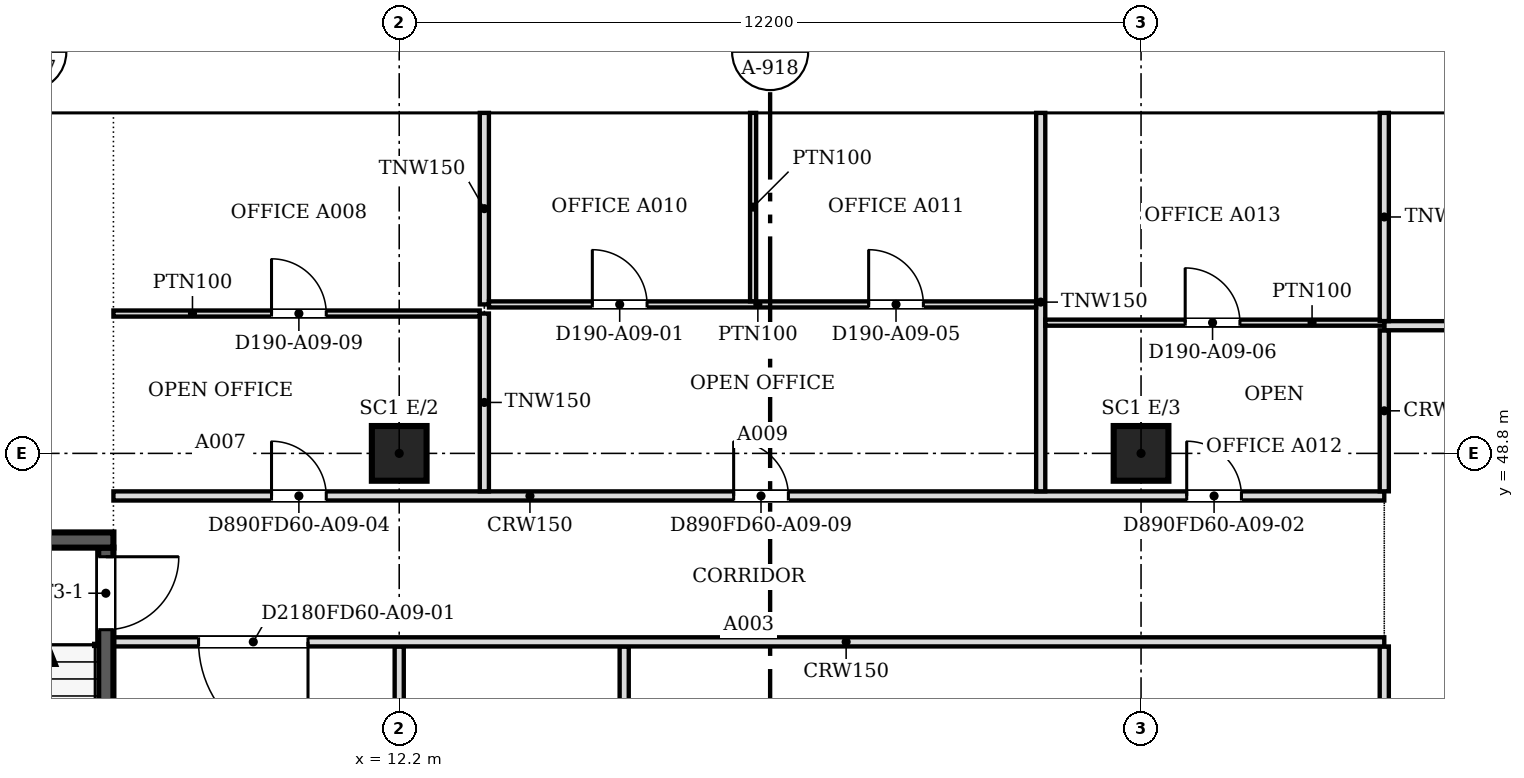
"""IFC4 building model, lengths in metres.
Left out: names, types, materials, properties, quantities, classifications, styles, units other than length and angle.
Written with IfcOpenShell. Run it as: python <this file> out.ifc"""

import sys

from ifc_helpers import new_model, si_unit, direction, frame, frame_2d, origin, origin_2d, place, context, subcontext, project, spatial, polyline, rectangle, outline, extrude, faceted_brep, source, transform, mapped, element, fill, save


model = new_model("IFC4")
c1 = context("Model", 3, precision=1e-05, world=origin(), true_north=direction((0.0, 1.0)))
c2 = subcontext(c1, "Body", "Model", "MODEL_VIEW")
j1 = project(units=[si_unit("LENGTHUNIT", "METRE"), si_unit("PLANEANGLEUNIT", "RADIAN")], contexts=[c1])
p1 = place(None, origin())
s1 = spatial("IfcSite", under=j1, at=p1, CompositionType="ELEMENT")
p2 = place(p1, origin())
s2 = spatial("IfcBuilding", under=s1, at=p2, CompositionType="ELEMENT")
p3 = place(p2, frame((0.0, 0.0, 99.0)))
s3 = spatial("IfcBuildingStorey", under=s2, at=p3, CompositionType="ELEMENT", Elevation=99.0)
for number, where, z_axis, x_axis in (
    (1, (12.2, 48.8, 0.0), (0.0, 0.0, 1.0), (1.0, 0.0, 0.0)),
    (2, (24.4, 48.8, 0.0), (0.0, 0.0, 1.0), (1.0, 0.0, 0.0)),
):
    element("IfcColumn", number, at=place(p3, frame(where, z_axis=z_axis, x_axis=x_axis)), inside=s3, PredefinedType="COLUMN", context=c2, shape_type="SweptSolid", body=[
        extrude(rectangle(XDim=0.9, YDim=0.9, at=origin_2d()), origin(), (0.0, 0.0, 1.0), 3.6),
    ])
m1 = source(origin(), c2, "Body", "SweptSolid", [
    extrude(outline(polyline([(3.05, 0.0), (6.1, 3.8), (3.05, 7.6), (0.0, 3.8), (3.05, 0.0)])), frame((0.0, 0.25, 0.0), z_axis=(0.0, -1.0, 0.0), x_axis=(1.0, 0.0, 0.0)), (0.0, 0.0, 1.0), 0.5),
])
p4 = place(p3, frame((33.55, 54.65, -3.8), z_axis=(0.0, 0.0, 1.0), x_axis=(-1.0, 0.0, 0.0)))
e3 = element("IfcWall", 3, at=p4, inside=s3, PredefinedType="SOLIDWALL", context=c2, shape_type="MappedRepresentation", body=[
    mapped(m1, transform((0.0, 0.0, 0.0), scale=1.0)),
])
m2 = source(origin(), c2, "Body", "SweptSolid", [
    extrude(outline(polyline([(3.05, 0.399), (5.78, 3.8), (3.05, 7.201), (0.321, 3.8), (3.05, 0.399)])), frame((0.0, 0.26, 0.0), z_axis=(0.0, -1.0, 0.0), x_axis=(1.0, 0.0, 0.0)), (0.0, 0.0, 1.0), 0.52),
])
p5 = place(p4, origin())
e4 = element("IfcOpeningElement", 4, at=p5, cuts=e3, PredefinedType="OPENING", context=c2, shape_type="MappedRepresentation", body=[
    mapped(m2, transform((0.0, 0.0, 0.0), scale=1.0)),
])
m3 = source(origin(), c2, "Body", "Brep", [
    faceted_brep([(3.05, -0.25, 0.0), (6.1, -0.25, 3.8), (6.1, -0.25, 3.8), (3.05, -0.25, 7.6), (0.0, -0.25, 3.8), (0.0, 0.25, 3.8), (3.05, 0.25, 7.6), (6.1, 0.25, 3.8), (6.1, 0.25, 3.8), (3.05, 0.25, 0.0)], [[[0, 1, 2, 3, 4]], [[5, 6, 7, 8, 9]], [[9, 8, 1, 0]], [[7, 6, 3, 2]], [[6, 5, 4, 3]], [[5, 9, 0, 4]], [[1, 8, 7, 2]]]),
])
p6 = place(p3, frame((27.45, 54.65, -3.8), z_axis=(0.0, 0.0, 1.0), x_axis=(-1.0, 0.0, 0.0)))
e5 = element("IfcWall", 5, at=p6, inside=s3, PredefinedType="SOLIDWALL", context=c2, shape_type="MappedRepresentation", body=[
    mapped(m3, transform((0.0, 0.0, 0.0), scale=1.0)),
])
p7 = place(p6, origin())
e6 = element("IfcOpeningElement", 6, at=p7, cuts=e5, PredefinedType="OPENING", context=c2, shape_type="MappedRepresentation", body=[
    mapped(m2, transform((0.0, 0.0, 0.0), scale=1.0)),
])
p8 = place(p3, frame((21.35, 54.65, -3.8), z_axis=(0.0, 0.0, 1.0), x_axis=(-1.0, 0.0, 0.0)))
e7 = element("IfcWall", 7, at=p8, inside=s3, PredefinedType="SOLIDWALL", context=c2, shape_type="MappedRepresentation", body=[
    mapped(m1, transform((0.0, 0.0, 0.0), scale=1.0)),
])
p9 = place(p8, origin())
e8 = element("IfcOpeningElement", 8, at=p9, cuts=e7, PredefinedType="OPENING", context=c2, shape_type="MappedRepresentation", body=[
    mapped(m2, transform((0.0, 0.0, 0.0), scale=1.0)),
])
p10 = place(p3, frame((15.25, 54.65, -3.8), z_axis=(0.0, 0.0, 1.0), x_axis=(-1.0, 0.0, 0.0)))
e9 = element("IfcWall", 9, at=p10, inside=s3, PredefinedType="SOLIDWALL", context=c2, shape_type="MappedRepresentation", body=[
    mapped(m1, transform((0.0, 0.0, 0.0), scale=1.0)),
])
p11 = place(p10, origin())
e10 = element("IfcOpeningElement", 10, at=p11, cuts=e9, PredefinedType="OPENING", context=c2, shape_type="MappedRepresentation", body=[
    mapped(m2, transform((0.0, 0.0, 0.0), scale=1.0)),
])
m4 = source(origin(), c2, "Body", "Brep", [
    faceted_brep([(3.003, -0.25, 0.0), (3.05, -0.25, 0.06), (3.05, -0.25, 7.54), (3.003, -0.25, 7.6), (0.0, -0.25, 3.8), (0.0, 0.25, 3.8), (2.957, 0.25, 7.541), (2.957, 0.25, 0.059), (3.003, 0.0, 0.0), (3.003, 0.0, 7.6)], [[[0, 1, 2, 3, 4]], [[5, 6, 7]], [[1, 0, 8]], [[9, 3, 2]], [[6, 5, 4, 3, 9]], [[5, 7, 8, 0, 4]], [[1, 8, 7, 6, 9, 2]]]),
])
p12 = place(p3, frame((9.15, 54.65, -3.8), z_axis=(0.0, 0.0, 1.0), x_axis=(-1.0, 0.0, 0.0)))
e11 = element("IfcWall", 11, at=p12, inside=s3, PredefinedType="SOLIDWALL", context=c2, shape_type="MappedRepresentation", body=[
    mapped(m4, transform((0.0, 0.0, 0.0), scale=1.0)),
])
m5 = source(origin(), c2, "Body", "SweptSolid", [
    extrude(outline(polyline([(2.803, 6.944), (0.319, 3.8), (2.803, 0.656), (2.803, 6.944)])), frame((0.0, 0.26, 0.0), z_axis=(0.0, -1.0, 0.0), x_axis=(1.0, 0.0, 0.0)), (0.0, 0.0, 1.0), 0.52),
])
p13 = place(p12, origin())
e12 = element("IfcOpeningElement", 12, at=p13, cuts=e11, PredefinedType="OPENING", context=c2, shape_type="MappedRepresentation", body=[
    mapped(m5, transform((0.0, 0.0, 0.0), scale=1.0)),
])
p14 = place(p2, frame((0.0, 0.0, 102.8)))
s4 = spatial("IfcBuildingStorey", under=s2, at=p14, CompositionType="ELEMENT", Elevation=102.8)
p15 = place(p14, frame((30.5, 54.65, -3.8), z_axis=(0.0, 0.0, 1.0), x_axis=(-1.0, 0.0, 0.0)))
e13 = element("IfcWall", 13, at=p15, inside=s4, PredefinedType="SOLIDWALL", context=c2, shape_type="MappedRepresentation", body=[
    mapped(m1, transform((0.0, 0.0, 0.0), scale=1.0)),
])
p16 = place(p15, origin())
e14 = element("IfcOpeningElement", 14, at=p16, cuts=e13, PredefinedType="OPENING", context=c2, shape_type="MappedRepresentation", body=[
    mapped(m2, transform((0.0, 0.0, 0.0), scale=1.0)),
])
p17 = place(p14, frame((24.4, 54.65, -3.8), z_axis=(0.0, 0.0, 1.0), x_axis=(-1.0, 0.0, 0.0)))
e15 = element("IfcWall", 15, at=p17, inside=s4, PredefinedType="SOLIDWALL", context=c2, shape_type="MappedRepresentation", body=[
    mapped(m3, transform((0.0, 0.0, 0.0), scale=1.0)),
])
p18 = place(p17, origin())
e16 = element("IfcOpeningElement", 16, at=p18, cuts=e15, PredefinedType="OPENING", context=c2, shape_type="MappedRepresentation", body=[
    mapped(m2, transform((0.0, 0.0, 0.0), scale=1.0)),
])
p19 = place(p14, frame((18.3, 54.65, -3.8), z_axis=(0.0, 0.0, 1.0), x_axis=(-1.0, 0.0, 0.0)))
e17 = element("IfcWall", 17, at=p19, inside=s4, PredefinedType="SOLIDWALL", context=c2, shape_type="MappedRepresentation", body=[
    mapped(m1, transform((0.0, 0.0, 0.0), scale=1.0)),
])
p20 = place(p19, origin())
e18 = element("IfcOpeningElement", 18, at=p20, cuts=e17, PredefinedType="OPENING", context=c2, shape_type="MappedRepresentation", body=[
    mapped(m2, transform((0.0, 0.0, 0.0), scale=1.0)),
])
m6 = source(origin(), c2, "Body", "Brep", [
    faceted_brep([(3.05, -0.25, 0.0), (6.053, -0.25, 3.8), (3.05, -0.25, 7.6), (0.0, -0.25, 3.8), (0.0, 0.25, 3.8), (3.05, 0.25, 7.6), (6.007, 0.25, 3.859), (6.007, 0.25, 3.741), (3.05, 0.25, 0.0), (6.053, 0.0, 3.8)], [[[0, 1, 2, 3]], [[4, 5, 6, 7, 8]], [[8, 7, 9, 1, 0]], [[6, 5, 2, 1, 9]], [[5, 4, 3, 2]], [[4, 8, 0, 3]], [[9, 7, 6]]]),
])
p21 = place(p14, frame((12.2, 54.65, -3.8), z_axis=(0.0, 0.0, 1.0), x_axis=(-1.0, 0.0, 0.0)))
e19 = element("IfcWall", 19, at=p21, inside=s4, PredefinedType="SOLIDWALL", context=c2, shape_type="MappedRepresentation", body=[
    mapped(m6, transform((0.0, 0.0, 0.0), scale=1.0)),
])
m7 = source(origin(), c2, "Body", "SweptSolid", [
    extrude(outline(polyline([(3.049, 0.401), (5.735, 3.8), (3.049, 7.199), (0.321, 3.8), (3.049, 0.401)])), frame((0.0, 0.26, 0.0), z_axis=(0.0, -1.0, 0.0), x_axis=(1.0, 0.0, 0.0)), (0.0, 0.0, 1.0), 0.52),
])
p22 = place(p21, origin())
e20 = element("IfcOpeningElement", 20, at=p22, cuts=e19, PredefinedType="OPENING", context=c2, shape_type="MappedRepresentation", body=[
    mapped(m7, transform((0.0, 0.0, 0.0), scale=1.0)),
])
p23 = place(p3, frame((3.6, 47.375, 0.0), z_axis=(0.0, 0.0, 1.0), x_axis=(1.0, 0.0, 0.0)))
e21 = element("IfcWall", 21, at=p23, inside=s3, PredefinedType="SOLIDWALL", context=c2, shape_type="SweptSolid", body=[
    extrude(rectangle(XDim=3.9, YDim=0.25, at=frame_2d((1.95, 0.0))), origin(), (0.0, 0.0, 1.0), 3.8),
])
p24 = place(p3, frame((7.375, 47.25, 0.0), z_axis=(0.0, 0.0, 1.0), x_axis=(0.0, -1.0, 0.0)))
e22 = element("IfcWall", 22, at=p24, inside=s3, PredefinedType="SOLIDWALL", context=c2, shape_type="SweptSolid", body=[
    extrude(rectangle(XDim=8.0, YDim=0.25, at=frame_2d((4.0, 0.0))), origin(), (0.0, 0.0, 1.0), 3.8),
])
m8 = source(origin(), c2, "Body", "SweptSolid", [
    extrude(rectangle(XDim=1.2, YDim=2.1, at=frame_2d((0.6, 1.05))), frame((0.0, 0.135, 0.0), z_axis=(0.0, -1.0, 0.0), x_axis=(1.0, 0.0, 0.0)), (0.0, 0.0, 1.0), 0.27),
])
p25 = place(p24, frame((0.15, 0.0, 0.0)))
e23 = element("IfcOpeningElement", 23, at=p25, cuts=e22, PredefinedType="OPENING", context=c2, shape_type="MappedRepresentation", body=[
    mapped(m8, transform((0.0, 0.0, 0.0), scale=1.0)),
])
p26 = place(p3, frame((28.4, 18.8, 0.0), z_axis=(0.0, 0.0, 1.0), x_axis=(0.0, 1.0, 0.0)))
e24 = element("IfcWall", 24, at=p26, inside=s3, PredefinedType="PARTITIONING", context=c2, shape_type="SweptSolid", body=[
    extrude(rectangle(XDim=26.824, YDim=0.15, at=frame_2d((13.412, 0.0))), origin(), (0.0, 0.0, 1.0), 3.067),
])
m9 = source(origin(), c2, "Body", "SweptSolid", [
    extrude(rectangle(XDim=0.9, YDim=2.1, at=frame_2d((0.45, 1.05))), frame((0.0, 0.085, 0.0), z_axis=(0.0, -1.0, 0.0), x_axis=(1.0, 0.0, 0.0)), (0.0, 0.0, 1.0), 0.17),
])
p27 = place(p26, frame((1.3, 0.0, 0.0)))
e25 = element("IfcOpeningElement", 25, at=p27, cuts=e24, PredefinedType="OPENING", context=c2, shape_type="MappedRepresentation", body=[
    mapped(m9, transform((0.0, 0.0, 0.0), scale=1.0)),
])
m10 = source(origin(), c2, "Body", "SweptSolid", [
    extrude(rectangle(XDim=1.0, YDim=2.1, at=frame_2d((0.5, 1.05))), frame((0.0, 0.085, 0.0), z_axis=(0.0, -1.0, 0.0), x_axis=(1.0, 0.0, 0.0)), (0.0, 0.0, 1.0), 0.17),
])
p28 = place(p26, frame((23.351, 0.0, 0.0)))
e26 = element("IfcOpeningElement", 26, at=p28, cuts=e24, PredefinedType="OPENING", context=c2, shape_type="MappedRepresentation", body=[
    mapped(m10, transform((0.0, 0.0, 0.0), scale=1.0)),
])
p29 = place(p26, frame((8.2, 0.0, 0.0)))
e27 = element("IfcOpeningElement", 27, at=p29, cuts=e24, PredefinedType="OPENING", context=c2, shape_type="MappedRepresentation", body=[
    mapped(m9, transform((0.0, 0.0, 0.0), scale=1.0)),
])
p30 = place(p26, frame((15.8, 0.0, 0.0)))
e28 = element("IfcOpeningElement", 28, at=p30, cuts=e24, PredefinedType="OPENING", context=c2, shape_type="MappedRepresentation", body=[
    mapped(m10, transform((0.0, 0.0, 0.0), scale=1.0)),
])
p31 = place(p3, frame((15.9, 39.65, 0.0), z_axis=(0.0, 0.0, 1.0), x_axis=(0.0, 1.0, 0.0)))
e29 = element("IfcWall", 29, at=p31, inside=s3, PredefinedType="PARTITIONING", context=c2, shape_type="SweptSolid", body=[
    extrude(rectangle(XDim=5.974, YDim=0.15, at=frame_2d((2.987, 0.0))), origin(), (0.0, 0.0, 1.0), 3.067),
])
p32 = place(p31, frame((2.5, 0.0, 0.0)))
e30 = element("IfcOpeningElement", 30, at=p32, cuts=e29, PredefinedType="OPENING", context=c2, shape_type="MappedRepresentation", body=[
    mapped(m9, transform((0.0, 0.0, 0.0), scale=1.0)),
])
p33 = place(p3, frame((12.2, 39.875, 0.0), z_axis=(0.0, 0.0, 1.0), x_axis=(0.0, 1.0, 0.0)))
e31 = element("IfcWall", 31, at=p33, inside=s3, PredefinedType="PARTITIONING", context=c2, shape_type="SweptSolid", body=[
    extrude(rectangle(XDim=5.749, YDim=0.15, at=frame_2d((2.875, 0.0))), origin(), (0.0, 0.0, 1.0), 3.067),
])
p34 = place(p3, frame((28.4, 45.7, 0.0), z_axis=(0.0, 0.0, 1.0), x_axis=(-1.0, 0.0, 0.0)))
e32 = element("IfcWall", 32, at=p34, inside=s3, PredefinedType="PARTITIONING", context=c2, shape_type="SweptSolid", body=[
    extrude(rectangle(XDim=20.9, YDim=0.15, at=frame_2d((10.45, 0.0))), origin(), (0.0, 0.0, 1.0), 3.067),
])
m11 = source(origin(), c2, "Body", "SweptSolid", [
    extrude(rectangle(XDim=1.8, YDim=2.1, at=frame_2d((0.9, 1.05))), frame((0.0, 0.085, 0.0), z_axis=(0.0, -1.0, 0.0), x_axis=(1.0, 0.0, 0.0)), (0.0, 0.0, 1.0), 0.17),
])
p35 = place(p34, frame((17.7, 0.0, 0.0)))
e33 = element("IfcOpeningElement", 33, at=p35, cuts=e32, PredefinedType="OPENING", context=c2, shape_type="MappedRepresentation", body=[
    mapped(m11, transform((0.0, 0.0, 0.0), scale=1.0)),
])
p36 = place(p3, frame((7.5, 48.1, 0.0), z_axis=(0.0, 0.0, 1.0), x_axis=(1.0, 0.0, 0.0)))
e34 = element("IfcWall", 34, at=p36, inside=s3, PredefinedType="PARTITIONING", context=c2, shape_type="SweptSolid", body=[
    extrude(rectangle(XDim=20.9, YDim=0.15, at=frame_2d((10.45, 0.0))), origin(), (0.0, 0.0, 1.0), 3.067),
])
p37 = place(p36, frame((17.651, 0.0, 0.0)))
e35 = element("IfcOpeningElement", 35, at=p37, cuts=e34, PredefinedType="OPENING", context=c2, shape_type="MappedRepresentation", body=[
    mapped(m9, transform((0.0, 0.0, 0.0), scale=1.0)),
])
p38 = place(p36, frame((2.6, 0.0, 0.0)))
e36 = element("IfcOpeningElement", 36, at=p38, cuts=e34, PredefinedType="OPENING", context=c2, shape_type="MappedRepresentation", body=[
    mapped(m9, transform((0.0, 0.0, 0.0), scale=1.0)),
])
p39 = place(p36, frame((10.2, 0.0, 0.0)))
e37 = element("IfcOpeningElement", 37, at=p39, cuts=e34, PredefinedType="OPENING", context=c2, shape_type="MappedRepresentation", body=[
    mapped(m9, transform((0.0, 0.0, 0.0), scale=1.0)),
])
p40 = place(p3, frame((13.6, 48.176, 0.0), z_axis=(0.0, 0.0, 1.0), x_axis=(0.0, 1.0, 0.0)))
e38 = element("IfcWall", 38, at=p40, inside=s3, PredefinedType="PARTITIONING", context=c2, shape_type="SweptSolid", body=[
    extrude(rectangle(XDim=2.924, YDim=0.15, at=frame_2d((1.462, 0.0))), origin(), (0.0, 0.0, 1.0), 3.067),
])
p41 = place(p3, frame((22.75, 48.176, 0.0), z_axis=(0.0, 0.0, 1.0), x_axis=(0.0, 1.0, 0.0)))
e39 = element("IfcWall", 39, at=p41, inside=s3, PredefinedType="PARTITIONING", context=c2, shape_type="SweptSolid", body=[
    extrude(rectangle(XDim=6.224, YDim=0.15, at=frame_2d((3.112, 0.0))), origin(), (0.0, 0.0, 1.0), 3.067),
])
p42 = place(p3, frame((28.4, 48.176, 0.0), z_axis=(0.0, 0.0, 1.0), x_axis=(0.0, 1.0, 0.0)))
e40 = element("IfcWall", 40, at=p42, inside=s3, PredefinedType="PARTITIONING", context=c2, shape_type="SweptSolid", body=[
    extrude(rectangle(XDim=2.648, YDim=0.15, at=frame_2d((1.324, 0.0))), origin(), (0.0, 0.0, 1.0), 3.067),
])
p43 = place(p3, frame((28.4, 50.9, 0.0), z_axis=(0.0, 0.0, 1.0), x_axis=(1.0, 0.0, 0.0)))
e41 = element("IfcWall", 41, at=p43, inside=s3, PredefinedType="PARTITIONING", context=c2, shape_type="SweptSolid", body=[
    extrude(rectangle(XDim=31.254, YDim=0.15, at=frame_2d((15.627, 0.0))), origin(), (0.0, 0.0, 1.0), 3.067),
])
p44 = place(p43, frame((4.1, 0.0, 0.0)))
e42 = element("IfcOpeningElement", 42, at=p44, cuts=e41, PredefinedType="OPENING", context=c2, shape_type="MappedRepresentation", body=[
    mapped(m9, transform((0.0, 0.0, 0.0), scale=1.0)),
])
p45 = place(p43, frame((13.25, 0.0, 0.0)))
e43 = element("IfcOpeningElement", 43, at=p45, cuts=e41, PredefinedType="OPENING", context=c2, shape_type="MappedRepresentation", body=[
    mapped(m9, transform((0.0, 0.0, 0.0), scale=1.0)),
])
p46 = place(p43, frame((24.3, 0.0, 0.0)))
e44 = element("IfcOpeningElement", 44, at=p46, cuts=e41, PredefinedType="OPENING", context=c2, shape_type="MappedRepresentation", body=[
    mapped(m9, transform((0.0, 0.0, 0.0), scale=1.0)),
])
p47 = place(p3, frame((22.826, 50.95, 0.0), z_axis=(0.0, 0.0, 1.0), x_axis=(1.0, 0.0, 0.0)))
e45 = element("IfcWall", 45, at=p47, inside=s3, PredefinedType="PARTITIONING", context=c2, shape_type="SweptSolid", body=[
    extrude(rectangle(XDim=5.573, YDim=0.1, at=frame_2d((2.787, 0.0))), origin(), (0.0, 0.0, 1.0), 3.067),
])
m12 = source(origin(), c2, "Body", "SweptSolid", [
    extrude(rectangle(XDim=0.9, YDim=2.1, at=frame_2d((0.45, 1.05))), frame((0.0, 0.06, 0.0), z_axis=(0.0, -1.0, 0.0), x_axis=(1.0, 0.0, 0.0)), (0.0, 0.0, 1.0), 0.12),
])
p48 = place(p47, frame((2.3, 0.0, 0.0)))
e46 = element("IfcOpeningElement", 46, at=p48, cuts=e45, PredefinedType="OPENING", context=c2, shape_type="MappedRepresentation", body=[
    mapped(m12, transform((0.0, 0.0, 0.0), scale=1.0)),
])
p49 = place(p3, frame((28.4, 50.976, 0.0), z_axis=(0.0, 0.0, 1.0), x_axis=(0.0, 1.0, 0.0)))
e47 = element("IfcWall", 47, at=p49, inside=s3, PredefinedType="PARTITIONING", context=c2, shape_type="SweptSolid", body=[
    extrude(rectangle(XDim=3.424, YDim=0.15, at=frame_2d((1.712, 0.0))), origin(), (0.0, 0.0, 1.0), 3.067),
])
p50 = place(p3, frame((7.5, 51.1, 0.0), z_axis=(0.0, 0.0, 1.0), x_axis=(1.0, 0.0, 0.0)))
e48 = element("IfcWall", 48, at=p50, inside=s3, PredefinedType="PARTITIONING", context=c2, shape_type="SweptSolid", body=[
    extrude(rectangle(XDim=6.024, YDim=0.1, at=frame_2d((3.012, 0.0))), origin(), (0.0, 0.0, 1.0), 3.067),
])
p51 = place(p50, frame((2.6, 0.0, 0.0)))
e49 = element("IfcOpeningElement", 49, at=p51, cuts=e48, PredefinedType="OPENING", context=c2, shape_type="MappedRepresentation", body=[
    mapped(m12, transform((0.0, 0.0, 0.0), scale=1.0)),
])
p52 = place(p3, frame((13.6, 51.25, 0.0), z_axis=(0.0, 0.0, 1.0), x_axis=(0.0, 1.0, 0.0)))
e50 = element("IfcWall", 50, at=p52, inside=s3, PredefinedType="PARTITIONING", context=c2, shape_type="SweptSolid", body=[
    extrude(rectangle(XDim=3.15, YDim=0.15, at=frame_2d((1.575, 0.0))), origin(), (0.0, 0.0, 1.0), 3.067),
])
p53 = place(p3, frame((13.676, 51.25, 0.0), z_axis=(0.0, 0.0, 1.0), x_axis=(1.0, 0.0, 0.0)))
e51 = element("IfcWall", 51, at=p53, inside=s3, PredefinedType="PARTITIONING", context=c2, shape_type="SweptSolid", body=[
    extrude(rectangle(XDim=8.998, YDim=0.1, at=frame_2d((4.499, 0.0))), origin(), (0.0, 0.0, 1.0), 3.067),
])
p54 = place(p53, frame((1.7, 0.0, 0.0)))
e52 = element("IfcOpeningElement", 52, at=p54, cuts=e51, PredefinedType="OPENING", context=c2, shape_type="MappedRepresentation", body=[
    mapped(m12, transform((0.0, 0.0, 0.0), scale=1.0)),
])
p55 = place(p53, frame((6.244, 0.0, 0.0)))
e53 = element("IfcOpeningElement", 53, at=p55, cuts=e51, PredefinedType="OPENING", context=c2, shape_type="MappedRepresentation", body=[
    mapped(m12, transform((0.0, 0.0, 0.0), scale=1.0)),
])
p56 = place(p3, frame((18.02, 51.301, 0.0), z_axis=(0.0, 0.0, 1.0), x_axis=(0.0, 1.0, 0.0)))
e54 = element("IfcWall", 54, at=p56, inside=s3, PredefinedType="PARTITIONING", context=c2, shape_type="SweptSolid", body=[
    extrude(rectangle(XDim=3.099, YDim=0.1, at=frame_2d((1.549, 0.0))), origin(), (0.0, 0.0, 1.0), 3.067),
])
m13 = source(origin(), c2, "Body", "SweptSolid", [
    extrude(rectangle(XDim=1.2, YDim=2.1, at=frame_2d((0.6, 1.05))), frame((0.0, 0.025, 0.0), z_axis=(0.0, -1.0, 0.0), x_axis=(1.0, 0.0, 0.0)), (0.0, 0.0, 1.0), 0.05),
])
p57 = place(p25, origin())
e55 = element("IfcDoor", 55, at=p57, inside=s3, OperationType="SINGLE_SWING_LEFT", PredefinedType="DOOR", context=c2, shape_type="MappedRepresentation", body=[
    mapped(m13, transform((0.0, 0.0, 0.0), scale=1.0)),
])
fill(e23, e55)
m14 = source(origin(), c2, "Body", "SweptSolid", [
    extrude(rectangle(XDim=0.9, YDim=2.1, at=frame_2d((0.45, 1.05))), frame((0.0, 0.025, 0.0), z_axis=(0.0, -1.0, 0.0), x_axis=(1.0, 0.0, 0.0)), (0.0, 0.0, 1.0), 0.05),
])
p58 = place(p54, origin())
e56 = element("IfcDoor", 56, at=p58, inside=s3, OperationType="SINGLE_SWING_LEFT", PredefinedType="DOOR", context=c2, shape_type="MappedRepresentation", body=[
    mapped(m14, transform((0.0, 0.0, 0.0), scale=1.0)),
])
fill(e52, e56)
p59 = place(p55, origin())
e57 = element("IfcDoor", 57, at=p59, inside=s3, OperationType="SINGLE_SWING_LEFT", PredefinedType="DOOR", context=c2, shape_type="MappedRepresentation", body=[
    mapped(m14, transform((0.0, 0.0, 0.0), scale=1.0)),
])
fill(e53, e57)
m15 = source(origin(), c2, "Body", "SweptSolid", [
    extrude(rectangle(XDim=1.8, YDim=2.1, at=frame_2d((0.9, 1.05))), frame((0.0, 0.025, 0.0), z_axis=(0.0, -1.0, 0.0), x_axis=(1.0, 0.0, 0.0)), (0.0, 0.0, 1.0), 0.05),
])
p60 = place(p35, origin())
e58 = element("IfcDoor", 58, at=p60, inside=s3, OperationType="DOUBLE_DOOR_SINGLE_SWING", PredefinedType="DOOR", context=c2, shape_type="MappedRepresentation", body=[
    mapped(m15, transform((0.0, 0.0, 0.0), scale=1.0)),
])
fill(e33, e58)
p61 = place(p48, origin())
e59 = element("IfcDoor", 59, at=p61, inside=s3, OperationType="SINGLE_SWING_LEFT", PredefinedType="DOOR", context=c2, shape_type="MappedRepresentation", body=[
    mapped(m14, transform((0.0, 0.0, 0.0), scale=1.0)),
])
fill(e46, e59)
p62 = place(p37, origin())
e60 = element("IfcDoor", 60, at=p62, inside=s3, OperationType="SINGLE_SWING_LEFT", PredefinedType="DOOR", context=c2, shape_type="MappedRepresentation", body=[
    mapped(m14, transform((0.0, 0.0, 0.0), scale=1.0)),
])
fill(e35, e60)
p63 = place(p51, origin())
e61 = element("IfcDoor", 61, at=p63, inside=s3, OperationType="SINGLE_SWING_LEFT", PredefinedType="DOOR", context=c2, shape_type="MappedRepresentation", body=[
    mapped(m14, transform((0.0, 0.0, 0.0), scale=1.0)),
])
fill(e49, e61)
p64 = place(p38, origin())
e62 = element("IfcDoor", 62, at=p64, inside=s3, OperationType="SINGLE_SWING_LEFT", PredefinedType="DOOR", context=c2, shape_type="MappedRepresentation", body=[
    mapped(m14, transform((0.0, 0.0, 0.0), scale=1.0)),
])
fill(e36, e62)
p65 = place(p39, origin())
e63 = element("IfcDoor", 63, at=p65, inside=s3, OperationType="SINGLE_SWING_LEFT", PredefinedType="DOOR", context=c2, shape_type="MappedRepresentation", body=[
    mapped(m14, transform((0.0, 0.0, 0.0), scale=1.0)),
])
fill(e37, e63)
save(model, sys.argv[1])
